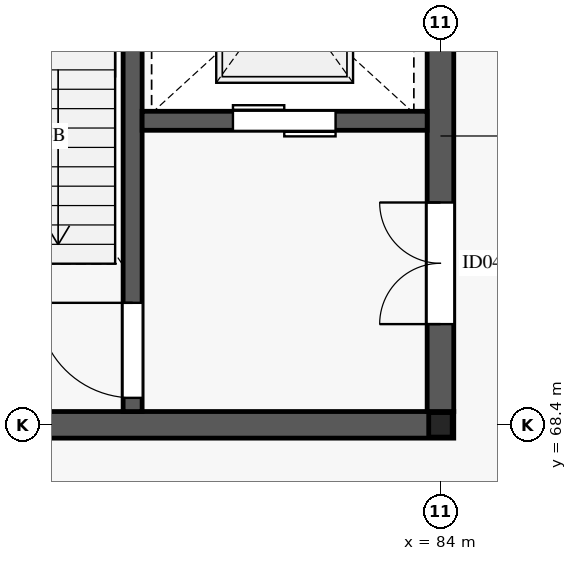
"""IFC4 building model, lengths in metres.
Left out: names, types, materials, properties, quantities, classifications, styles, units other than length and angle.
Written with IfcOpenShell. Run it as: python <this file> out.ifc"""

import sys

from ifc_helpers import new_model, si_unit, direction, frame, frame_2d, origin, origin_2d, place, context, subcontext, project, spatial, rectangle, i_section, extrude, element, fill, save


model = new_model("IFC4")
c1 = context("Model", 3, precision=1e-05, world=origin(), true_north=direction((0.0, 1.0)))
c2 = subcontext(c1, "Body", "Model", "MODEL_VIEW")
j1 = project(units=[si_unit("LENGTHUNIT", "METRE"), si_unit("PLANEANGLEUNIT", "RADIAN")], contexts=[c1])
p1 = place(None, origin())
s1 = spatial("IfcSite", under=j1, at=p1, CompositionType="ELEMENT")
p2 = place(p1, origin())
s2 = spatial("IfcBuilding", under=s1, at=p2, CompositionType="ELEMENT")
p3 = place(p2, frame((0.0, 0.0, 25.2)))
s3 = spatial("IfcBuildingStorey", under=s2, at=p3, CompositionType="ELEMENT", Elevation=25.2)
p4 = place(p3, frame((84.0, 68.4, 0.0), z_axis=(0.0, 0.0, 1.0), x_axis=(1.0, 0.0, 0.0)))
e1 = element("IfcColumn", 1, at=p4, inside=s3, PredefinedType="COLUMN", context=c2, shape_type="SweptSolid", body=[
    extrude(i_section(OverallWidth=0.309, OverallDepth=0.323, WebThickness=0.014, FlangeThickness=0.023, FilletRadius=0.015, at=origin_2d()), origin(), (0.0, 0.0, 1.0), 3.995),
])
p5 = place(p3, frame((75.825, 68.4, 0.0), z_axis=(0.0, 0.0, 1.0), x_axis=(1.0, 0.0, 0.0)))
e2 = element("IfcWall", 2, at=p5, inside=s3, PredefinedType="SHEAR", context=c2, shape_type="SweptSolid", body=[
    extrude(rectangle(XDim=8.35, YDim=0.35, at=frame_2d((4.175, 0.0))), origin(), (0.0, 0.0, 1.0), 3.99),
])
p6 = place(p3, frame((84.0, 68.575, 0.0), z_axis=(0.0, 0.0, 1.0), x_axis=(0.0, 1.0, 0.0)))
e3 = element("IfcWall", 3, at=p6, inside=s3, PredefinedType="SHEAR", context=c2, shape_type="SweptSolid", body=[
    extrude(rectangle(XDim=7.25, YDim=0.35, at=frame_2d((3.625, 0.0))), origin(), (0.0, 0.0, 1.0), 3.99),
])
p7 = place(p6, frame((1.15, 0.0, 0.0)))
e4 = element("IfcOpeningElement", 4, at=p7, cuts=e3, PredefinedType="OPENING", context=c2, shape_type="SweptSolid", body=[
    extrude(rectangle(XDim=1.6, YDim=2.35, at=frame_2d((0.8, 1.175))), frame((0.0, 0.185, 0.0), z_axis=(0.0, -1.0, 0.0), x_axis=(1.0, 0.0, 0.0)), (0.0, 0.0, 1.0), 0.37),
])
p8 = place(p3, frame((79.95, 68.575, 0.0), z_axis=(0.0, 0.0, 1.0), x_axis=(0.0, 1.0, 0.0)))
e5 = element("IfcWall", 5, at=p8, inside=s3, PredefinedType="SHEAR", context=c2, shape_type="SweptSolid", body=[
    extrude(rectangle(XDim=7.25, YDim=0.25, at=frame_2d((3.625, 0.0))), origin(), (0.0, 0.0, 1.0), 3.99),
])
p9 = place(p8, frame((0.18, 0.0, 0.0)))
e6 = element("IfcOpeningElement", 6, at=p9, cuts=e5, PredefinedType="OPENING", context=c2, shape_type="SweptSolid", body=[
    extrude(rectangle(XDim=1.25, YDim=2.2, at=frame_2d((0.625, 1.1))), frame((0.0, 0.135, 0.0), z_axis=(0.0, -1.0, 0.0), x_axis=(1.0, 0.0, 0.0)), (0.0, 0.0, 1.0), 0.27),
])
p10 = place(p3, frame((80.075, 72.4, 0.0), z_axis=(0.0, 0.0, 1.0), x_axis=(1.0, 0.0, 0.0)))
e7 = element("IfcWall", 7, at=p10, inside=s3, PredefinedType="SHEAR", context=c2, shape_type="SweptSolid", body=[
    extrude(rectangle(XDim=3.75, YDim=0.25, at=frame_2d((1.875, 0.0))), origin(), (0.0, 0.0, 1.0), 3.99),
])
p11 = place(p10, frame((1.195, 0.0, 0.0)))
e8 = element("IfcOpeningElement", 8, at=p11, cuts=e7, PredefinedType="OPENING", context=c2, shape_type="SweptSolid", body=[
    extrude(rectangle(XDim=1.35, YDim=2.2, at=frame_2d((0.675, 1.1))), frame((0.0, 0.135, 0.0), z_axis=(0.0, -1.0, 0.0), x_axis=(1.0, 0.0, 0.0)), (0.0, 0.0, 1.0), 0.27),
])
p12 = place(p9, origin())
e9 = element("IfcDoor", 9, at=p12, inside=s3, OperationType="SINGLE_SWING_RIGHT", PredefinedType="DOOR", context=c2, shape_type="SweptSolid", body=[
    extrude(rectangle(XDim=1.25, YDim=2.2, at=frame_2d((0.625, 1.1))), frame((0.0, 0.025, 0.0), z_axis=(0.0, -1.0, 0.0), x_axis=(1.0, 0.0, 0.0)), (0.0, 0.0, 1.0), 0.05),
])
fill(e6, e9)
p13 = place(p7, origin())
e10 = element("IfcDoor", 10, at=p13, inside=s3, OperationType="DOUBLE_DOOR_SINGLE_SWING", PredefinedType="DOOR", context=c2, shape_type="SweptSolid", body=[
    extrude(rectangle(XDim=1.6, YDim=2.35, at=frame_2d((0.8, 1.175))), frame((0.0, 0.025, 0.0), z_axis=(0.0, -1.0, 0.0), x_axis=(1.0, 0.0, 0.0)), (0.0, 0.0, 1.0), 0.05),
])
fill(e4, e10)
p14 = place(p11, origin())
e11 = element("IfcDoor", 11, at=p14, inside=s3, OperationType="DOUBLE_DOOR_SLIDING", PredefinedType="DOOR", context=c2, shape_type="SweptSolid", body=[
    extrude(rectangle(XDim=1.35, YDim=2.2, at=frame_2d((0.675, 1.1))), frame((0.0, 0.025, 0.0), z_axis=(0.0, -1.0, 0.0), x_axis=(1.0, 0.0, 0.0)), (0.0, 0.0, 1.0), 0.05),
])
fill(e8, e11)
save(model, sys.argv[1])
